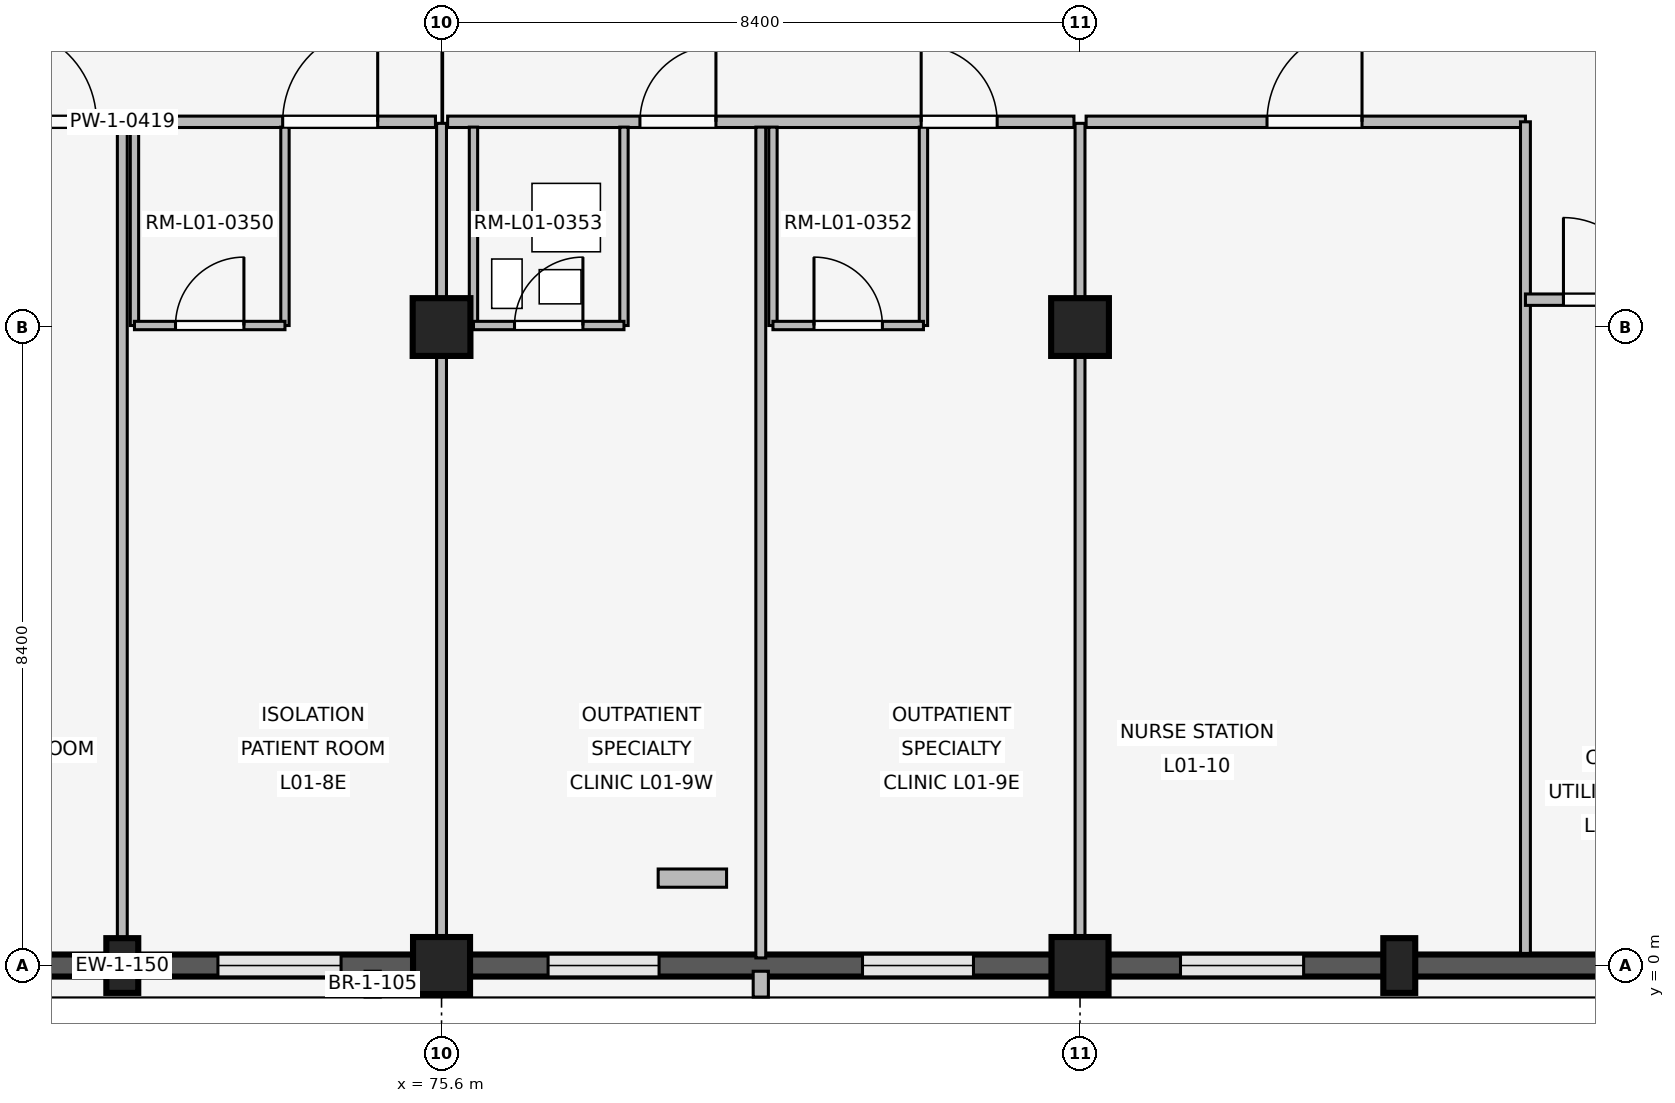
"""IFC4 building model, lengths in metres.
Left out: names, types, materials, properties, quantities, classifications, styles, units other than length and angle.
Written with IfcOpenShell. Run it as: python <this file> out.ifc"""

import sys

from ifc_helpers import new_model, si_unit, direction, frame, frame_2d, origin, origin_2d, place, context, subcontext, project, spatial, rectangle, extrude, element, fill, save


model = new_model("IFC4")
c1 = context("Model", 3, precision=1e-05, world=origin(), true_north=direction((0.0, 1.0)))
c2 = subcontext(c1, "Body", "Model", "MODEL_VIEW")
j1 = project(units=[si_unit("LENGTHUNIT", "METRE"), si_unit("PLANEANGLEUNIT", "RADIAN")], contexts=[c1])
p1 = place(None, origin())
s1 = spatial("IfcSite", under=j1, at=p1, CompositionType="ELEMENT")
p2 = place(p1, origin())
s2 = spatial("IfcBuilding", under=s1, at=p2, CompositionType="ELEMENT")
p3 = place(p2, frame((0.0, 0.0, 4.8)))
s3 = spatial("IfcBuildingStorey", under=s2, at=p3, CompositionType="ELEMENT", Elevation=4.8)
p4 = place(p3, frame((75.6, 0.0, 0.0), z_axis=(0.0, 0.0, 1.0), x_axis=(1.0, 0.0, 0.0)))
e1 = element("IfcColumn", 1, at=p4, inside=s3, PredefinedType="COLUMN", context=c2, shape_type="SweptSolid", body=[
    extrude(rectangle(XDim=0.75, YDim=0.75, at=origin_2d()), origin(), (0.0, 0.0, 1.0), 3.3),
])
p5 = place(p3, frame((75.6, 8.4, 0.0), z_axis=(0.0, 0.0, 1.0), x_axis=(1.0, 0.0, 0.0)))
e2 = element("IfcColumn", 2, at=p5, inside=s3, PredefinedType="COLUMN", context=c2, shape_type="SweptSolid", body=[
    extrude(rectangle(XDim=0.76, YDim=0.76, at=origin_2d()), origin(), (0.0, 0.0, 1.0), 3.3),
])
p6 = place(p3, frame((84.0, 0.0, 0.0), z_axis=(0.0, 0.0, 1.0), x_axis=(1.0, 0.0, 0.0)))
e3 = element("IfcColumn", 3, at=p6, inside=s3, PredefinedType="COLUMN", context=c2, shape_type="SweptSolid", body=[
    extrude(rectangle(XDim=0.75, YDim=0.75, at=origin_2d()), origin(), (0.0, 0.0, 1.0), 3.3),
])
p7 = place(p3, frame((84.0, 8.4, 0.0), z_axis=(0.0, 0.0, 1.0), x_axis=(1.0, 0.0, 0.0)))
e4 = element("IfcColumn", 4, at=p7, inside=s3, PredefinedType="COLUMN", context=c2, shape_type="SweptSolid", body=[
    extrude(rectangle(XDim=0.76, YDim=0.76, at=origin_2d()), origin(), (0.0, 0.0, 1.0), 3.3),
])
for number, where, z_axis, x_axis in (
    (5, (71.4, 0.0, 0.0), (0.0, 0.0, 1.0), (1.0, 0.0, 0.0)),
    (6, (88.2, 0.0, 0.0), (0.0, 0.0, 1.0), (1.0, 0.0, 0.0)),
):
    element("IfcColumn", number, at=place(p3, frame(where, z_axis=z_axis, x_axis=x_axis)), inside=s3, PredefinedType="PILASTER", context=c2, shape_type="SweptSolid", body=[
        extrude(rectangle(XDim=0.42, YDim=0.72, at=origin_2d()), origin(), (0.0, 0.0, 1.0), 3.3),
    ])
p8 = place(p3, frame((75.23, 0.0, 0.0), z_axis=(0.0, 0.0, 1.0), x_axis=(-1.0, 0.0, 0.0)))
e7 = element("IfcWall", 7, at=p8, inside=s3, PredefinedType="SOLIDWALL", context=c2, shape_type="SweptSolid", body=[
    extrude(rectangle(XDim=7.66, YDim=0.29, at=frame_2d((3.83, 0.0))), origin(), (0.0, 0.0, 1.0), 2.42),
])
p9 = place(p8, frame((0.952, 0.0, 0.85)))
e8 = element("IfcOpeningElement", 8, at=p9, cuts=e7, PredefinedType="OPENING", context=c2, shape_type="SweptSolid", body=[
    extrude(rectangle(XDim=1.62, YDim=0.95, at=frame_2d((0.81, 0.475))), frame((0.0, 0.155, 0.0), z_axis=(0.0, -1.0, 0.0), x_axis=(1.0, 0.0, 0.0)), (0.0, 0.0, 1.0), 0.31),
])
p10 = place(p8, frame((5.088, 0.0, 0.85)))
e9 = element("IfcOpeningElement", 9, at=p10, cuts=e7, PredefinedType="OPENING", context=c2, shape_type="SweptSolid", body=[
    extrude(rectangle(XDim=1.62, YDim=0.95, at=frame_2d((0.81, 0.475))), frame((0.0, 0.155, 0.0), z_axis=(0.0, -1.0, 0.0), x_axis=(1.0, 0.0, 0.0)), (0.0, 0.0, 1.0), 0.31),
])
p11 = place(p3, frame((74.694, -0.075, 0.0), z_axis=(0.0, 0.0, 1.0), x_axis=(0.0, -1.0, 0.0)))
e10 = element("IfcWall", 10, at=p11, inside=s3, PredefinedType="ELEMENTEDWALL", context=c2, shape_type="SweptSolid", body=[
    extrude(rectangle(XDim=0.34, YDim=0.2, at=frame_2d((0.17, 0.0))), origin(), (0.0, 0.0, 1.0), 2.4),
])
p12 = place(p3, frame((83.63, 0.0, 0.0), z_axis=(0.0, 0.0, 1.0), x_axis=(-1.0, 0.0, 0.0)))
e11 = element("IfcWall", 11, at=p12, inside=s3, PredefinedType="SOLIDWALL", context=c2, shape_type="SweptSolid", body=[
    extrude(rectangle(XDim=7.66, YDim=0.29, at=frame_2d((3.83, 0.0))), origin(), (0.0, 0.0, 1.0), 2.42),
])
p13 = place(p12, frame((1.032, 0.0, 0.85)))
e12 = element("IfcOpeningElement", 12, at=p13, cuts=e11, PredefinedType="OPENING", context=c2, shape_type="SweptSolid", body=[
    extrude(rectangle(XDim=1.46, YDim=0.85, at=frame_2d((0.73, 0.425))), frame((0.0, 0.155, 0.0), z_axis=(0.0, -1.0, 0.0), x_axis=(1.0, 0.0, 0.0)), (0.0, 0.0, 1.0), 0.31),
])
p14 = place(p12, frame((5.168, 0.0, 0.85)))
e13 = element("IfcOpeningElement", 13, at=p14, cuts=e11, PredefinedType="OPENING", context=c2, shape_type="SweptSolid", body=[
    extrude(rectangle(XDim=1.46, YDim=0.85, at=frame_2d((0.73, 0.425))), frame((0.0, 0.155, 0.0), z_axis=(0.0, -1.0, 0.0), x_axis=(1.0, 0.0, 0.0)), (0.0, 0.0, 1.0), 0.31),
])
p15 = place(p3, frame((79.8, -0.075, 0.0), z_axis=(0.0, 0.0, 1.0), x_axis=(0.0, -1.0, 0.0)))
e14 = element("IfcWall", 14, at=p15, inside=s3, PredefinedType="ELEMENTEDWALL", context=c2, shape_type="SweptSolid", body=[
    extrude(rectangle(XDim=0.34, YDim=0.2, at=frame_2d((0.17, 0.0))), origin(), (0.0, 0.0, 1.0), 2.4),
])
p16 = place(p3, frame((92.03, 0.0, 0.0), z_axis=(0.0, 0.0, 1.0), x_axis=(-1.0, 0.0, 0.0)))
e15 = element("IfcWall", 15, at=p16, inside=s3, PredefinedType="SOLIDWALL", context=c2, shape_type="SweptSolid", body=[
    extrude(rectangle(XDim=7.66, YDim=0.29, at=frame_2d((3.83, 0.0))), origin(), (0.0, 0.0, 1.0), 2.42),
])
p17 = place(p16, frame((5.088, 0.0, 0.85)))
e16 = element("IfcOpeningElement", 16, at=p17, cuts=e15, PredefinedType="OPENING", context=c2, shape_type="SweptSolid", body=[
    extrude(rectangle(XDim=1.62, YDim=0.95, at=frame_2d((0.81, 0.475))), frame((0.0, 0.155, 0.0), z_axis=(0.0, -1.0, 0.0), x_axis=(1.0, 0.0, 0.0)), (0.0, 0.0, 1.0), 0.31),
])
p18 = place(p3, frame((67.28, 11.1, 0.0), z_axis=(0.0, 0.0, 1.0), x_axis=(1.0, 0.0, 0.0)))
e17 = element("IfcWall", 17, at=p18, inside=s3, PredefinedType="PARTITIONING", context=c2, shape_type="SweptSolid", body=[
    extrude(rectangle(XDim=8.24, YDim=0.15, at=frame_2d((4.12, 0.0))), origin(), (0.0, 0.0, 1.0), 2.4),
])
p19 = place(p18, frame((2.53, 0.0, 0.0)))
e18 = element("IfcOpeningElement", 18, at=p19, cuts=e17, PredefinedType="OPENING", context=c2, shape_type="SweptSolid", body=[
    extrude(rectangle(XDim=1.25, YDim=2.2, at=frame_2d((0.625, 1.1))), frame((0.0, 0.085, 0.0), z_axis=(0.0, -1.0, 0.0), x_axis=(1.0, 0.0, 0.0)), (0.0, 0.0, 1.0), 0.17),
])
p20 = place(p18, frame((6.23, 0.0, 0.0)))
e19 = element("IfcOpeningElement", 19, at=p20, cuts=e17, PredefinedType="OPENING", context=c2, shape_type="SweptSolid", body=[
    extrude(rectangle(XDim=1.25, YDim=2.2, at=frame_2d((0.625, 1.1))), frame((0.0, 0.085, 0.0), z_axis=(0.0, -1.0, 0.0), x_axis=(1.0, 0.0, 0.0)), (0.0, 0.0, 1.0), 0.17),
])
p21 = place(p3, frame((71.4, 0.1, 0.0), z_axis=(0.0, 0.0, 1.0), x_axis=(0.0, 1.0, 0.0)))
e20 = element("IfcWall", 20, at=p21, inside=s3, PredefinedType="PARTITIONING", context=c2, shape_type="SweptSolid", body=[
    extrude(rectangle(XDim=10.93, YDim=0.13, at=frame_2d((5.465, 0.0))), origin(), (0.0, 0.0, 1.0), 2.4),
])
for number, where, z_axis, x_axis in (
    (21, (71.56, 8.42, 0.0), (0.0, 0.0, 1.0), (0.0, 1.0, 0.0)),
    (22, (73.54, 8.42, 0.0), (0.0, 0.0, 1.0), (0.0, 1.0, 0.0)),
):
    element("IfcWall", number, at=place(p3, frame(where, z_axis=z_axis, x_axis=x_axis)), inside=s3, PredefinedType="PARTITIONING", context=c2, shape_type="SweptSolid", body=[
        extrude(rectangle(XDim=2.61, YDim=0.11, at=frame_2d((1.305, 0.0))), origin(), (0.0, 0.0, 1.0), 2.4),
    ])
p22 = place(p3, frame((71.56, 8.42, 0.0), z_axis=(0.0, 0.0, 1.0), x_axis=(1.0, 0.0, 0.0)))
e23 = element("IfcWall", 23, at=p22, inside=s3, PredefinedType="PARTITIONING", context=c2, shape_type="SweptSolid", body=[
    extrude(rectangle(XDim=1.98, YDim=0.11, at=frame_2d((0.99, 0.0))), origin(), (0.0, 0.0, 1.0), 2.4),
])
p23 = place(p22, frame((0.54, 0.0, 0.0)))
e24 = element("IfcOpeningElement", 24, at=p23, cuts=e23, PredefinedType="OPENING", context=c2, shape_type="SweptSolid", body=[
    extrude(rectangle(XDim=0.9, YDim=2.1, at=frame_2d((0.45, 1.05))), frame((0.0, 0.065, 0.0), z_axis=(0.0, -1.0, 0.0), x_axis=(1.0, 0.0, 0.0)), (0.0, 0.0, 1.0), 0.13),
])
p24 = place(p3, frame((75.6, 0.14, 0.0), z_axis=(0.0, 0.0, 1.0), x_axis=(0.0, 1.0, 0.0)))
e25 = element("IfcWall", 25, at=p24, inside=s3, PredefinedType="PARTITIONING", context=c2, shape_type="SweptSolid", body=[
    extrude(rectangle(XDim=10.94, YDim=0.13, at=frame_2d((5.47, 0.0))), origin(), (0.0, 0.0, 1.0), 2.4),
])
p25 = place(p3, frame((75.68, 11.1, 0.0), z_axis=(0.0, 0.0, 1.0), x_axis=(1.0, 0.0, 0.0)))
e26 = element("IfcWall", 26, at=p25, inside=s3, PredefinedType="PARTITIONING", context=c2, shape_type="SweptSolid", body=[
    extrude(rectangle(XDim=8.24, YDim=0.15, at=frame_2d((4.12, 0.0))), origin(), (0.0, 0.0, 1.0), 2.4),
])
p26 = place(p25, frame((2.53, 0.0, 0.0)))
e27 = element("IfcOpeningElement", 27, at=p26, cuts=e26, PredefinedType="OPENING", context=c2, shape_type="SweptSolid", body=[
    extrude(rectangle(XDim=1.0, YDim=2.15, at=frame_2d((0.5, 1.075))), frame((0.0, 0.085, 0.0), z_axis=(0.0, -1.0, 0.0), x_axis=(1.0, 0.0, 0.0)), (0.0, 0.0, 1.0), 0.17),
])
p27 = place(p25, frame((6.23, 0.0, 0.0)))
e28 = element("IfcOpeningElement", 28, at=p27, cuts=e26, PredefinedType="OPENING", context=c2, shape_type="SweptSolid", body=[
    extrude(rectangle(XDim=1.0, YDim=2.15, at=frame_2d((0.5, 1.075))), frame((0.0, 0.085, 0.0), z_axis=(0.0, -1.0, 0.0), x_axis=(1.0, 0.0, 0.0)), (0.0, 0.0, 1.0), 0.17),
])
p28 = place(p3, frame((79.8, 0.1, 0.0), z_axis=(0.0, 0.0, 1.0), x_axis=(0.0, 1.0, 0.0)))
e29 = element("IfcWall", 29, at=p28, inside=s3, PredefinedType="PARTITIONING", context=c2, shape_type="SweptSolid", body=[
    extrude(rectangle(XDim=10.93, YDim=0.13, at=frame_2d((5.465, 0.0))), origin(), (0.0, 0.0, 1.0), 2.4),
])
for number, where, z_axis, x_axis in (
    (30, (76.02, 8.42, 0.0), (0.0, 0.0, 1.0), (0.0, 1.0, 0.0)),
    (31, (78.0, 8.42, 0.0), (0.0, 0.0, 1.0), (0.0, 1.0, 0.0)),
):
    element("IfcWall", number, at=place(p3, frame(where, z_axis=z_axis, x_axis=x_axis)), inside=s3, PredefinedType="PARTITIONING", context=c2, shape_type="SweptSolid", body=[
        extrude(rectangle(XDim=2.61, YDim=0.11, at=frame_2d((1.305, 0.0))), origin(), (0.0, 0.0, 1.0), 2.4),
    ])
p29 = place(p3, frame((76.02, 8.42, 0.0), z_axis=(0.0, 0.0, 1.0), x_axis=(1.0, 0.0, 0.0)))
e32 = element("IfcWall", 32, at=p29, inside=s3, PredefinedType="PARTITIONING", context=c2, shape_type="SweptSolid", body=[
    extrude(rectangle(XDim=1.98, YDim=0.11, at=frame_2d((0.99, 0.0))), origin(), (0.0, 0.0, 1.0), 2.4),
])
p30 = place(p29, frame((0.54, 0.0, 0.0)))
e33 = element("IfcOpeningElement", 33, at=p30, cuts=e32, PredefinedType="OPENING", context=c2, shape_type="SweptSolid", body=[
    extrude(rectangle(XDim=0.9, YDim=2.1, at=frame_2d((0.45, 1.05))), frame((0.0, 0.065, 0.0), z_axis=(0.0, -1.0, 0.0), x_axis=(1.0, 0.0, 0.0)), (0.0, 0.0, 1.0), 0.13),
])
for number, where, z_axis, x_axis in (
    (34, (79.96, 8.42, 0.0), (0.0, 0.0, 1.0), (0.0, 1.0, 0.0)),
    (35, (81.94, 8.42, 0.0), (0.0, 0.0, 1.0), (0.0, 1.0, 0.0)),
):
    element("IfcWall", number, at=place(p3, frame(where, z_axis=z_axis, x_axis=x_axis)), inside=s3, PredefinedType="PARTITIONING", context=c2, shape_type="SweptSolid", body=[
        extrude(rectangle(XDim=2.61, YDim=0.11, at=frame_2d((1.305, 0.0))), origin(), (0.0, 0.0, 1.0), 2.4),
    ])
p31 = place(p3, frame((79.96, 8.42, 0.0), z_axis=(0.0, 0.0, 1.0), x_axis=(1.0, 0.0, 0.0)))
e36 = element("IfcWall", 36, at=p31, inside=s3, PredefinedType="PARTITIONING", context=c2, shape_type="SweptSolid", body=[
    extrude(rectangle(XDim=1.98, YDim=0.11, at=frame_2d((0.99, 0.0))), origin(), (0.0, 0.0, 1.0), 2.4),
])
p32 = place(p31, frame((0.54, 0.0, 0.0)))
e37 = element("IfcOpeningElement", 37, at=p32, cuts=e36, PredefinedType="OPENING", context=c2, shape_type="SweptSolid", body=[
    extrude(rectangle(XDim=0.9, YDim=2.1, at=frame_2d((0.45, 1.05))), frame((0.0, 0.065, 0.0), z_axis=(0.0, -1.0, 0.0), x_axis=(1.0, 0.0, 0.0)), (0.0, 0.0, 1.0), 0.13),
])
p33 = place(p3, frame((78.45, 1.15, 0.0), z_axis=(0.0, 0.0, 1.0), x_axis=(1.0, 0.0, 0.0)))
e38 = element("IfcWall", 38, at=p33, inside=s3, PredefinedType="PLUMBINGWALL", context=c2, shape_type="SweptSolid", body=[
    extrude(rectangle(XDim=0.9, YDim=0.24, at=frame_2d((0.45, 0.0))), origin(), (0.0, 0.0, 1.0), 2.4),
])
p34 = place(p3, frame((84.0, 0.14, 0.0), z_axis=(0.0, 0.0, 1.0), x_axis=(0.0, 1.0, 0.0)))
e39 = element("IfcWall", 39, at=p34, inside=s3, PredefinedType="PARTITIONING", context=c2, shape_type="SweptSolid", body=[
    extrude(rectangle(XDim=10.94, YDim=0.13, at=frame_2d((5.47, 0.0))), origin(), (0.0, 0.0, 1.0), 2.4),
])
p35 = place(p3, frame((84.08, 11.1, 0.0), z_axis=(0.0, 0.0, 1.0), x_axis=(1.0, 0.0, 0.0)))
e40 = element("IfcWall", 40, at=p35, inside=s3, PredefinedType="PARTITIONING", context=c2, shape_type="SweptSolid", body=[
    extrude(rectangle(XDim=5.78, YDim=0.15, at=frame_2d((2.89, 0.0))), origin(), (0.0, 0.0, 1.0), 2.4),
])
p36 = place(p35, frame((2.38, 0.0, 0.0)))
e41 = element("IfcOpeningElement", 41, at=p36, cuts=e40, PredefinedType="OPENING", context=c2, shape_type="SweptSolid", body=[
    extrude(rectangle(XDim=1.25, YDim=2.2, at=frame_2d((0.625, 1.1))), frame((0.0, 0.085, 0.0), z_axis=(0.0, -1.0, 0.0), x_axis=(1.0, 0.0, 0.0)), (0.0, 0.0, 1.0), 0.17),
])
p37 = place(p3, frame((89.86, 0.16, 0.0), z_axis=(0.0, 0.0, 1.0), x_axis=(0.0, 1.0, 0.0)))
e42 = element("IfcWall", 42, at=p37, inside=s3, PredefinedType="PARTITIONING", context=c2, shape_type="SweptSolid", body=[
    extrude(rectangle(XDim=10.94, YDim=0.13, at=frame_2d((5.47, 0.0))), origin(), (0.0, 0.0, 1.0), 2.4),
])
p38 = place(p3, frame((89.86, 8.76, 0.0), z_axis=(0.0, 0.0, 1.0), x_axis=(1.0, 0.0, 0.0)))
e43 = element("IfcWall", 43, at=p38, inside=s3, PredefinedType="PARTITIONING", context=c2, shape_type="SweptSolid", body=[
    extrude(rectangle(XDim=2.18, YDim=0.15, at=frame_2d((1.09, 0.0))), origin(), (0.0, 0.0, 1.0), 2.4),
])
p39 = place(p38, frame((0.5, 0.0, 0.0)))
e44 = element("IfcOpeningElement", 44, at=p39, cuts=e43, PredefinedType="OPENING", context=c2, shape_type="SweptSolid", body=[
    extrude(rectangle(XDim=1.08, YDim=2.15, at=frame_2d((0.54, 1.075))), frame((0.0, 0.085, 0.0), z_axis=(0.0, -1.0, 0.0), x_axis=(1.0, 0.0, 0.0)), (0.0, 0.0, 1.0), 0.17),
])
p40 = place(p9, origin())
e45 = element("IfcWindow", 45, at=p40, inside=s3, PartitioningType="SINGLE_PANEL", PredefinedType="WINDOW", context=c2, shape_type="SweptSolid", body=[
    extrude(rectangle(XDim=1.62, YDim=0.95, at=frame_2d((0.81, 0.475))), frame((0.0, 0.03, 0.0), z_axis=(0.0, -1.0, 0.0), x_axis=(1.0, 0.0, 0.0)), (0.0, 0.0, 1.0), 0.06),
])
fill(e8, e45)
p41 = place(p13, origin())
e46 = element("IfcWindow", 46, at=p41, inside=s3, PartitioningType="SINGLE_PANEL", PredefinedType="WINDOW", context=c2, shape_type="SweptSolid", body=[
    extrude(rectangle(XDim=1.46, YDim=0.85, at=frame_2d((0.73, 0.425))), frame((0.0, 0.03, 0.0), z_axis=(0.0, -1.0, 0.0), x_axis=(1.0, 0.0, 0.0)), (0.0, 0.0, 1.0), 0.06),
])
fill(e12, e46)
p42 = place(p14, origin())
e47 = element("IfcWindow", 47, at=p42, inside=s3, PartitioningType="SINGLE_PANEL", PredefinedType="WINDOW", context=c2, shape_type="SweptSolid", body=[
    extrude(rectangle(XDim=1.46, YDim=0.85, at=frame_2d((0.73, 0.425))), frame((0.0, 0.03, 0.0), z_axis=(0.0, -1.0, 0.0), x_axis=(1.0, 0.0, 0.0)), (0.0, 0.0, 1.0), 0.06),
])
fill(e13, e47)
p43 = place(p17, origin())
e48 = element("IfcWindow", 48, at=p43, inside=s3, PartitioningType="SINGLE_PANEL", PredefinedType="WINDOW", context=c2, shape_type="SweptSolid", body=[
    extrude(rectangle(XDim=1.62, YDim=0.95, at=frame_2d((0.81, 0.475))), frame((0.0, 0.03, 0.0), z_axis=(0.0, -1.0, 0.0), x_axis=(1.0, 0.0, 0.0)), (0.0, 0.0, 1.0), 0.06),
])
fill(e16, e48)
p44 = place(p19, origin())
e49 = element("IfcDoor", 49, at=p44, inside=s3, OperationType="SINGLE_SWING_LEFT", PredefinedType="DOOR", context=c2, shape_type="SweptSolid", body=[
    extrude(rectangle(XDim=1.25, YDim=2.2, at=frame_2d((0.625, 1.1))), frame((0.0, 0.025, 0.0), z_axis=(0.0, -1.0, 0.0), x_axis=(1.0, 0.0, 0.0)), (0.0, 0.0, 1.0), 0.05),
])
fill(e18, e49)
p45 = place(p20, origin())
e50 = element("IfcDoor", 50, at=p45, inside=s3, OperationType="SINGLE_SWING_RIGHT", PredefinedType="DOOR", context=c2, shape_type="SweptSolid", body=[
    extrude(rectangle(XDim=1.25, YDim=2.2, at=frame_2d((0.625, 1.1))), frame((0.0, 0.025, 0.0), z_axis=(0.0, -1.0, 0.0), x_axis=(1.0, 0.0, 0.0)), (0.0, 0.0, 1.0), 0.05),
])
fill(e19, e50)
p46 = place(p23, origin())
e51 = element("IfcDoor", 51, at=p46, inside=s3, OperationType="SINGLE_SWING_RIGHT", PredefinedType="DOOR", context=c2, shape_type="SweptSolid", body=[
    extrude(rectangle(XDim=0.9, YDim=2.1, at=frame_2d((0.45, 1.05))), frame((0.0, 0.025, 0.0), z_axis=(0.0, -1.0, 0.0), x_axis=(1.0, 0.0, 0.0)), (0.0, 0.0, 1.0), 0.05),
])
fill(e24, e51)
p47 = place(p26, origin())
e52 = element("IfcDoor", 52, at=p47, inside=s3, OperationType="SINGLE_SWING_RIGHT", PredefinedType="DOOR", context=c2, shape_type="SweptSolid", body=[
    extrude(rectangle(XDim=1.0, YDim=2.15, at=frame_2d((0.5, 1.075))), frame((0.0, 0.025, 0.0), z_axis=(0.0, -1.0, 0.0), x_axis=(1.0, 0.0, 0.0)), (0.0, 0.0, 1.0), 0.05),
])
fill(e27, e52)
p48 = place(p27, origin())
e53 = element("IfcDoor", 53, at=p48, inside=s3, OperationType="SINGLE_SWING_LEFT", PredefinedType="DOOR", context=c2, shape_type="SweptSolid", body=[
    extrude(rectangle(XDim=1.0, YDim=2.15, at=frame_2d((0.5, 1.075))), frame((0.0, 0.025, 0.0), z_axis=(0.0, -1.0, 0.0), x_axis=(1.0, 0.0, 0.0)), (0.0, 0.0, 1.0), 0.05),
])
fill(e28, e53)
p49 = place(p30, origin())
e54 = element("IfcDoor", 54, at=p49, inside=s3, OperationType="SINGLE_SWING_RIGHT", PredefinedType="DOOR", context=c2, shape_type="SweptSolid", body=[
    extrude(rectangle(XDim=0.9, YDim=2.1, at=frame_2d((0.45, 1.05))), frame((0.0, 0.025, 0.0), z_axis=(0.0, -1.0, 0.0), x_axis=(1.0, 0.0, 0.0)), (0.0, 0.0, 1.0), 0.05),
])
fill(e33, e54)
p50 = place(p32, origin())
e55 = element("IfcDoor", 55, at=p50, inside=s3, OperationType="SINGLE_SWING_LEFT", PredefinedType="DOOR", context=c2, shape_type="SweptSolid", body=[
    extrude(rectangle(XDim=0.9, YDim=2.1, at=frame_2d((0.45, 1.05))), frame((0.0, 0.025, 0.0), z_axis=(0.0, -1.0, 0.0), x_axis=(1.0, 0.0, 0.0)), (0.0, 0.0, 1.0), 0.05),
])
fill(e37, e55)
p51 = place(p36, origin())
e56 = element("IfcDoor", 56, at=p51, inside=s3, OperationType="SINGLE_SWING_RIGHT", PredefinedType="DOOR", context=c2, shape_type="SweptSolid", body=[
    extrude(rectangle(XDim=1.25, YDim=2.2, at=frame_2d((0.625, 1.1))), frame((0.0, 0.025, 0.0), z_axis=(0.0, -1.0, 0.0), x_axis=(1.0, 0.0, 0.0)), (0.0, 0.0, 1.0), 0.05),
])
fill(e41, e56)
p52 = place(p39, origin())
e57 = element("IfcDoor", 57, at=p52, inside=s3, OperationType="SINGLE_SWING_LEFT", PredefinedType="DOOR", context=c2, shape_type="SweptSolid", body=[
    extrude(rectangle(XDim=1.08, YDim=2.15, at=frame_2d((0.54, 1.075))), frame((0.0, 0.025, 0.0), z_axis=(0.0, -1.0, 0.0), x_axis=(1.0, 0.0, 0.0)), (0.0, 0.0, 1.0), 0.05),
])
fill(e44, e57)
save(model, sys.argv[1])
